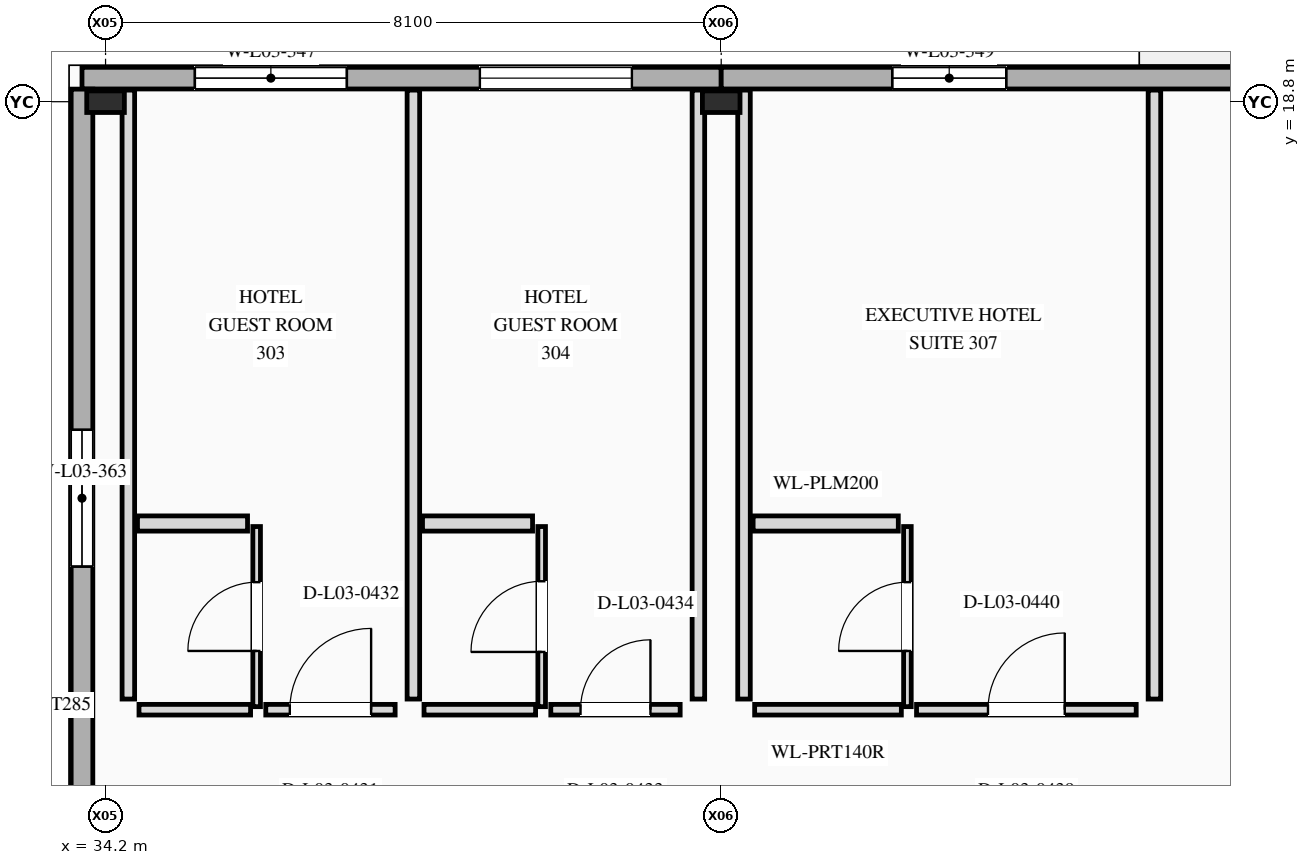
"""IFC4 building model, lengths in metres.
Left out: names, types, materials, properties, quantities, classifications, styles, units other than length and angle.
Written with IfcOpenShell. Run it as: python <this file> out.ifc"""

import sys

from ifc_helpers import new_model, si_unit, direction, frame, frame_2d, origin, origin_2d, place, context, subcontext, project, spatial, rectangle, i_section, extrude, element, fill, save


model = new_model("IFC4")
c1 = context("Model", 3, precision=1e-05, world=origin(), true_north=direction((0.0, 1.0)))
c2 = subcontext(c1, "Body", "Model", "MODEL_VIEW")
j1 = project(units=[si_unit("LENGTHUNIT", "METRE"), si_unit("PLANEANGLEUNIT", "RADIAN")], contexts=[c1])
p1 = place(None, origin())
s1 = spatial("IfcSite", under=j1, at=p1, CompositionType="ELEMENT")
p2 = place(p1, origin())
s2 = spatial("IfcBuilding", under=s1, at=p2, CompositionType="ELEMENT")
p3 = place(p2, frame((0.0, 0.0, 15.6)))
s3 = spatial("IfcBuildingStorey", under=s2, at=p3, CompositionType="ELEMENT", Elevation=15.6)
for number, where, z_axis, x_axis in (
    (1, (34.2, 18.8, 0.0), (0.0, 0.0, 1.0), (0.0, 1.0, 0.0)),
    (2, (42.3, 18.8, 0.0), (0.0, 0.0, 1.0), (0.0, 1.0, 0.0)),
):
    element("IfcColumn", number, at=place(p3, frame(where, z_axis=z_axis, x_axis=x_axis)), inside=s3, PredefinedType="COLUMN", context=c2, shape_type="SweptSolid", body=[
        extrude(i_section(OverallWidth=0.284, OverallDepth=0.495, WebThickness=0.019, FlangeThickness=0.033, at=origin_2d()), origin(), (0.0, 0.0, 1.0), 3.9),
    ])
p4 = place(p3, frame((42.3, 19.11, 0.0), z_axis=(0.0, 0.0, 1.0), x_axis=(-1.0, 0.0, 0.0)))
e3 = element("IfcWall", 3, at=p4, inside=s3, PredefinedType="STANDARD", context=c2, shape_type="SweptSolid", body=[
    extrude(rectangle(XDim=8.41, YDim=0.285, at=frame_2d((4.205, 0.0))), origin(), (0.0, 0.0, 1.0), 3.9),
])
p5 = place(p4, frame((4.925, 0.0, 0.85)))
e4 = element("IfcOpeningElement", 4, at=p5, cuts=e3, PredefinedType="OPENING", context=c2, shape_type="SweptSolid", body=[
    extrude(rectangle(XDim=2.0, YDim=1.65, at=frame_2d((1.0, 0.825))), frame((0.0, 0.152, 0.0), z_axis=(0.0, -1.0, 0.0), x_axis=(1.0, 0.0, 0.0)), (0.0, 0.0, 1.0), 0.305),
])
p6 = place(p4, frame((1.175, 0.0, 0.85)))
e5 = element("IfcOpeningElement", 5, at=p6, cuts=e3, PredefinedType="OPENING", context=c2, shape_type="SweptSolid", body=[
    extrude(rectangle(XDim=2.0, YDim=1.65, at=frame_2d((1.0, 0.825))), frame((0.0, 0.152, 0.0), z_axis=(0.0, -1.0, 0.0), x_axis=(1.0, 0.0, 0.0)), (0.0, 0.0, 1.0), 0.305),
])
p7 = place(p3, frame((50.4, 19.11, 0.0), z_axis=(0.0, 0.0, 1.0), x_axis=(-1.0, 0.0, 0.0)))
e6 = element("IfcWall", 6, at=p7, inside=s3, PredefinedType="STANDARD", context=c2, shape_type="SweptSolid", body=[
    extrude(rectangle(XDim=8.1, YDim=0.285, at=frame_2d((4.05, 0.0))), origin(), (0.0, 0.0, 1.0), 3.9),
])
p8 = place(p7, frame((4.35, 0.0, 0.85)))
e7 = element("IfcOpeningElement", 7, at=p8, cuts=e6, PredefinedType="OPENING", context=c2, shape_type="SweptSolid", body=[
    extrude(rectangle(XDim=1.5, YDim=1.7, at=frame_2d((0.75, 0.85))), frame((0.0, 0.152, 0.0), z_axis=(0.0, -1.0, 0.0), x_axis=(1.0, 0.0, 0.0)), (0.0, 0.0, 1.0), 0.305),
])
p9 = place(p3, frame((33.89, 18.966, 0.0), z_axis=(0.0, 0.0, 1.0), x_axis=(0.0, -1.0, 0.0)))
e8 = element("IfcWall", 8, at=p9, inside=s3, PredefinedType="STANDARD", context=c2, shape_type="SweptSolid", body=[
    extrude(rectangle(XDim=10.766, YDim=0.285, at=frame_2d((5.383, 0.0))), origin(), (0.0, 0.0, 1.0), 3.9),
])
p10 = place(p9, frame((4.483, 0.0, 0.88)))
e9 = element("IfcOpeningElement", 9, at=p10, cuts=e8, PredefinedType="OPENING", context=c2, shape_type="SweptSolid", body=[
    extrude(rectangle(XDim=1.8, YDim=1.8, at=frame_2d((0.9, 0.9))), frame((0.0, 0.152, 0.0), z_axis=(0.0, -1.0, 0.0), x_axis=(1.0, 0.0, 0.0)), (0.0, 0.0, 1.0), 0.305),
])
p11 = place(p3, frame((34.64, 10.8, 0.0), z_axis=(0.0, 0.0, 1.0), x_axis=(1.0, 0.0, 0.0)))
e10 = element("IfcWall", 10, at=p11, inside=s3, PredefinedType="PARTITIONING", context=c2, shape_type="SweptSolid", body=[
    extrude(rectangle(XDim=1.468, YDim=0.14, at=frame_2d((0.734, 0.0))), origin(), (0.0, 0.0, 1.0), 3.6),
])
p12 = place(p3, frame((36.308, 10.8, 0.0), z_axis=(0.0, 0.0, 1.0), x_axis=(1.0, 0.0, 0.0)))
e11 = element("IfcWall", 11, at=p12, inside=s3, PredefinedType="PARTITIONING", context=c2, shape_type="SweptSolid", body=[
    extrude(rectangle(XDim=1.702, YDim=0.14, at=frame_2d((0.851, 0.0))), origin(), (0.0, 0.0, 1.0), 3.6),
])
p13 = place(p12, frame((0.316, 0.0, 0.0)))
e12 = element("IfcOpeningElement", 12, at=p13, cuts=e11, PredefinedType="OPENING", context=c2, shape_type="SweptSolid", body=[
    extrude(rectangle(XDim=1.07, YDim=2.25, at=frame_2d((0.535, 1.125))), frame((0.0, 0.08, 0.0), z_axis=(0.0, -1.0, 0.0), x_axis=(1.0, 0.0, 0.0)), (0.0, 0.0, 1.0), 0.16),
])
p14 = place(p3, frame((34.5, 10.94, 0.0), z_axis=(0.0, 0.0, 1.0), x_axis=(0.0, 1.0, 0.0)))
e13 = element("IfcWall", 13, at=p14, inside=s3, PredefinedType="PARTITIONING", context=c2, shape_type="SweptSolid", body=[
    extrude(rectangle(XDim=8.012, YDim=0.165, at=frame_2d((4.006, 0.0))), origin(), (0.0, 0.0, 1.0), 2.929),
])
p15 = place(p3, frame((38.25, 10.94, 0.0), z_axis=(0.0, 0.0, 1.0), x_axis=(0.0, 1.0, 0.0)))
e14 = element("IfcWall", 14, at=p15, inside=s3, PredefinedType="PARTITIONING", context=c2, shape_type="SweptSolid", body=[
    extrude(rectangle(XDim=8.012, YDim=0.165, at=frame_2d((4.006, 0.0))), origin(), (0.0, 0.0, 1.0), 3.013),
])
p16 = place(p3, frame((36.188, 10.84, 0.0), z_axis=(0.0, 0.0, 1.0), x_axis=(0.0, 1.0, 0.0)))
e15 = element("IfcWall", 15, at=p16, inside=s3, PredefinedType="PARTITIONING", context=c2, shape_type="SweptSolid", body=[
    extrude(rectangle(XDim=2.37, YDim=0.1, at=frame_2d((1.185, 0.0))), origin(), (0.0, 0.0, 1.0), 3.269),
])
p17 = place(p16, frame((0.733, 0.0, 0.0)))
e16 = element("IfcOpeningElement", 16, at=p17, cuts=e15, PredefinedType="OPENING", context=c2, shape_type="SweptSolid", body=[
    extrude(rectangle(XDim=0.905, YDim=2.18, at=frame_2d((0.453, 1.09))), frame((0.0, 0.06, 0.0), z_axis=(0.0, -1.0, 0.0), x_axis=(1.0, 0.0, 0.0)), (0.0, 0.0, 1.0), 0.12),
])
p18 = place(p3, frame((34.62, 13.25, 0.0), z_axis=(0.0, 0.0, 1.0), x_axis=(1.0, 0.0, 0.0)))
e17 = element("IfcWall", 17, at=p18, inside=s3, PredefinedType="PLUMBINGWALL", context=c2, shape_type="SweptSolid", body=[
    extrude(rectangle(XDim=1.448, YDim=0.2, at=frame_2d((0.724, 0.0))), origin(), (0.0, 0.0, 1.0), 3.6),
])
p19 = place(p3, frame((38.39, 10.8, 0.0), z_axis=(0.0, 0.0, 1.0), x_axis=(1.0, 0.0, 0.0)))
e18 = element("IfcWall", 18, at=p19, inside=s3, PredefinedType="PARTITIONING", context=c2, shape_type="SweptSolid", body=[
    extrude(rectangle(XDim=1.468, YDim=0.14, at=frame_2d((0.734, 0.0))), origin(), (0.0, 0.0, 1.0), 3.6),
])
p20 = place(p3, frame((40.058, 10.8, 0.0), z_axis=(0.0, 0.0, 1.0), x_axis=(1.0, 0.0, 0.0)))
e19 = element("IfcWall", 19, at=p20, inside=s3, PredefinedType="PARTITIONING", context=c2, shape_type="SweptSolid", body=[
    extrude(rectangle(XDim=1.702, YDim=0.14, at=frame_2d((0.851, 0.0))), origin(), (0.0, 0.0, 1.0), 3.6),
])
p21 = place(p20, frame((0.391, 0.0, 0.0)))
e20 = element("IfcOpeningElement", 20, at=p21, cuts=e19, PredefinedType="OPENING", context=c2, shape_type="SweptSolid", body=[
    extrude(rectangle(XDim=0.92, YDim=2.3, at=frame_2d((0.46, 1.15))), frame((0.0, 0.08, 0.0), z_axis=(0.0, -1.0, 0.0), x_axis=(1.0, 0.0, 0.0)), (0.0, 0.0, 1.0), 0.16),
])
p22 = place(p3, frame((42.0, 10.94, 0.0), z_axis=(0.0, 0.0, 1.0), x_axis=(0.0, 1.0, 0.0)))
e21 = element("IfcWall", 21, at=p22, inside=s3, PredefinedType="PARTITIONING", context=c2, shape_type="SweptSolid", body=[
    extrude(rectangle(XDim=8.012, YDim=0.165, at=frame_2d((4.006, 0.0))), origin(), (0.0, 0.0, 1.0), 2.929),
])
p23 = place(p3, frame((39.938, 10.84, 0.0), z_axis=(0.0, 0.0, 1.0), x_axis=(0.0, 1.0, 0.0)))
e22 = element("IfcWall", 22, at=p23, inside=s3, PredefinedType="PARTITIONING", context=c2, shape_type="SweptSolid", body=[
    extrude(rectangle(XDim=2.37, YDim=0.1, at=frame_2d((1.185, 0.0))), origin(), (0.0, 0.0, 1.0), 3.269),
])
p24 = place(p23, frame((0.72, 0.0, 0.0)))
e23 = element("IfcOpeningElement", 23, at=p24, cuts=e22, PredefinedType="OPENING", context=c2, shape_type="SweptSolid", body=[
    extrude(rectangle(XDim=0.93, YDim=2.22, at=frame_2d((0.465, 1.11))), frame((0.0, 0.06, 0.0), z_axis=(0.0, -1.0, 0.0), x_axis=(1.0, 0.0, 0.0)), (0.0, 0.0, 1.0), 0.12),
])
p25 = place(p3, frame((38.37, 13.25, 0.0), z_axis=(0.0, 0.0, 1.0), x_axis=(1.0, 0.0, 0.0)))
e24 = element("IfcWall", 24, at=p25, inside=s3, PredefinedType="PLUMBINGWALL", context=c2, shape_type="SweptSolid", body=[
    extrude(rectangle(XDim=1.448, YDim=0.2, at=frame_2d((0.724, 0.0))), origin(), (0.0, 0.0, 1.0), 3.6),
])
p26 = place(p3, frame((42.74, 10.8, 0.0), z_axis=(0.0, 0.0, 1.0), x_axis=(1.0, 0.0, 0.0)))
e25 = element("IfcWall", 25, at=p26, inside=s3, PredefinedType="PARTITIONING", context=c2, shape_type="SweptSolid", body=[
    extrude(rectangle(XDim=1.93, YDim=0.14, at=frame_2d((0.965, 0.0))), origin(), (0.0, 0.0, 1.0), 3.6),
])
p27 = place(p3, frame((44.87, 10.8, 0.0), z_axis=(0.0, 0.0, 1.0), x_axis=(1.0, 0.0, 0.0)))
e26 = element("IfcWall", 26, at=p27, inside=s3, PredefinedType="PARTITIONING", context=c2, shape_type="SweptSolid", body=[
    extrude(rectangle(XDim=2.89, YDim=0.14, at=frame_2d((1.445, 0.0))), origin(), (0.0, 0.0, 1.0), 3.6),
])
p28 = place(p27, frame((0.94, 0.0, 0.0)))
e27 = element("IfcOpeningElement", 27, at=p28, cuts=e26, PredefinedType="OPENING", context=c2, shape_type="SweptSolid", body=[
    extrude(rectangle(XDim=1.01, YDim=2.35, at=frame_2d((0.505, 1.175))), frame((0.0, 0.08, 0.0), z_axis=(0.0, -1.0, 0.0), x_axis=(1.0, 0.0, 0.0)), (0.0, 0.0, 1.0), 0.16),
])
p29 = place(p3, frame((42.6, 10.94, 0.0), z_axis=(0.0, 0.0, 1.0), x_axis=(0.0, 1.0, 0.0)))
e28 = element("IfcWall", 28, at=p29, inside=s3, PredefinedType="PARTITIONING", context=c2, shape_type="SweptSolid", body=[
    extrude(rectangle(XDim=8.012, YDim=0.165, at=frame_2d((4.006, 0.0))), origin(), (0.0, 0.0, 1.0), 2.929),
])
p30 = place(p3, frame((48.0, 10.94, 0.0), z_axis=(0.0, 0.0, 1.0), x_axis=(0.0, 1.0, 0.0)))
e29 = element("IfcWall", 29, at=p30, inside=s3, PredefinedType="PARTITIONING", context=c2, shape_type="SweptSolid", body=[
    extrude(rectangle(XDim=8.012, YDim=0.165, at=frame_2d((4.006, 0.0))), origin(), (0.0, 0.0, 1.0), 3.6),
])
p31 = place(p3, frame((44.75, 10.84, 0.0), z_axis=(0.0, 0.0, 1.0), x_axis=(0.0, 1.0, 0.0)))
e30 = element("IfcWall", 30, at=p31, inside=s3, PredefinedType="PARTITIONING", context=c2, shape_type="SweptSolid", body=[
    extrude(rectangle(XDim=2.37, YDim=0.1, at=frame_2d((1.185, 0.0))), origin(), (0.0, 0.0, 1.0), 3.6),
])
p32 = place(p31, frame((0.733, 0.0, 0.0)))
e31 = element("IfcOpeningElement", 31, at=p32, cuts=e30, PredefinedType="OPENING", context=c2, shape_type="SweptSolid", body=[
    extrude(rectangle(XDim=0.905, YDim=2.1, at=frame_2d((0.453, 1.05))), frame((0.0, 0.06, 0.0), z_axis=(0.0, -1.0, 0.0), x_axis=(1.0, 0.0, 0.0)), (0.0, 0.0, 1.0), 0.12),
])
p33 = place(p3, frame((42.72, 13.25, 0.0), z_axis=(0.0, 0.0, 1.0), x_axis=(1.0, 0.0, 0.0)))
e32 = element("IfcWall", 32, at=p33, inside=s3, PredefinedType="PLUMBINGWALL", context=c2, shape_type="SweptSolid", body=[
    extrude(rectangle(XDim=1.91, YDim=0.2, at=frame_2d((0.955, 0.0))), origin(), (0.0, 0.0, 1.0), 3.6),
])
p34 = place(p5, origin())
e33 = element("IfcWindow", 33, at=p34, inside=s3, PartitioningType="SINGLE_PANEL", PredefinedType="WINDOW", context=c2, shape_type="SweptSolid", body=[
    extrude(rectangle(XDim=2.0, YDim=1.65, at=frame_2d((1.0, 0.825))), frame((0.0, 0.03, 0.0), z_axis=(0.0, -1.0, 0.0), x_axis=(1.0, 0.0, 0.0)), (0.0, 0.0, 1.0), 0.06),
])
fill(e4, e33)
p35 = place(p6, origin())
e34 = element("IfcWindow", 34, at=p35, inside=s3, PartitioningType="SINGLE_PANEL", PredefinedType="WINDOW", context=c2, shape_type="SweptSolid", body=[
    extrude(rectangle(XDim=2.0, YDim=1.65, at=frame_2d((1.0, 0.825))), frame((0.0, 0.03, 0.0), z_axis=(0.0, -1.0, 0.0), x_axis=(1.0, 0.0, 0.0)), (0.0, 0.0, 1.0), 0.06),
])
fill(e5, e34)
p36 = place(p8, origin())
e35 = element("IfcWindow", 35, at=p36, inside=s3, PartitioningType="SINGLE_PANEL", PredefinedType="WINDOW", context=c2, shape_type="SweptSolid", body=[
    extrude(rectangle(XDim=1.5, YDim=1.7, at=frame_2d((0.75, 0.85))), frame((0.0, 0.03, 0.0), z_axis=(0.0, -1.0, 0.0), x_axis=(1.0, 0.0, 0.0)), (0.0, 0.0, 1.0), 0.06),
])
fill(e7, e35)
p37 = place(p10, origin())
e36 = element("IfcWindow", 36, at=p37, inside=s3, PartitioningType="SINGLE_PANEL", PredefinedType="WINDOW", context=c2, shape_type="SweptSolid", body=[
    extrude(rectangle(XDim=1.8, YDim=1.8, at=frame_2d((0.9, 0.9))), frame((0.0, 0.03, 0.0), z_axis=(0.0, -1.0, 0.0), x_axis=(1.0, 0.0, 0.0)), (0.0, 0.0, 1.0), 0.06),
])
fill(e9, e36)
p38 = place(p13, origin())
e37 = element("IfcDoor", 37, at=p38, inside=s3, OperationType="SINGLE_SWING_RIGHT", PredefinedType="DOOR", context=c2, shape_type="SweptSolid", body=[
    extrude(rectangle(XDim=1.07, YDim=2.25, at=frame_2d((0.535, 1.125))), frame((0.0, 0.025, 0.0), z_axis=(0.0, -1.0, 0.0), x_axis=(1.0, 0.0, 0.0)), (0.0, 0.0, 1.0), 0.05),
])
fill(e12, e37)
p39 = place(p17, origin())
e38 = element("IfcDoor", 38, at=p39, inside=s3, OperationType="SINGLE_SWING_LEFT", PredefinedType="DOOR", context=c2, shape_type="SweptSolid", body=[
    extrude(rectangle(XDim=0.905, YDim=2.18, at=frame_2d((0.453, 1.09))), frame((0.0, 0.025, 0.0), z_axis=(0.0, -1.0, 0.0), x_axis=(1.0, 0.0, 0.0)), (0.0, 0.0, 1.0), 0.05),
])
fill(e16, e38)
p40 = place(p21, origin())
e39 = element("IfcDoor", 39, at=p40, inside=s3, OperationType="SINGLE_SWING_RIGHT", PredefinedType="DOOR", context=c2, shape_type="SweptSolid", body=[
    extrude(rectangle(XDim=0.92, YDim=2.3, at=frame_2d((0.46, 1.15))), frame((0.0, 0.025, 0.0), z_axis=(0.0, -1.0, 0.0), x_axis=(1.0, 0.0, 0.0)), (0.0, 0.0, 1.0), 0.05),
])
fill(e20, e39)
p41 = place(p24, origin())
e40 = element("IfcDoor", 40, at=p41, inside=s3, OperationType="SINGLE_SWING_LEFT", PredefinedType="DOOR", context=c2, shape_type="SweptSolid", body=[
    extrude(rectangle(XDim=0.93, YDim=2.22, at=frame_2d((0.465, 1.11))), frame((0.0, 0.025, 0.0), z_axis=(0.0, -1.0, 0.0), x_axis=(1.0, 0.0, 0.0)), (0.0, 0.0, 1.0), 0.05),
])
fill(e23, e40)
p42 = place(p28, origin())
e41 = element("IfcDoor", 41, at=p42, inside=s3, OperationType="SINGLE_SWING_RIGHT", PredefinedType="DOOR", context=c2, shape_type="SweptSolid", body=[
    extrude(rectangle(XDim=1.01, YDim=2.35, at=frame_2d((0.505, 1.175))), frame((0.0, 0.025, 0.0), z_axis=(0.0, -1.0, 0.0), x_axis=(1.0, 0.0, 0.0)), (0.0, 0.0, 1.0), 0.05),
])
fill(e27, e41)
p43 = place(p32, origin())
e42 = element("IfcDoor", 42, at=p43, inside=s3, OperationType="SINGLE_SWING_LEFT", PredefinedType="DOOR", context=c2, shape_type="SweptSolid", body=[
    extrude(rectangle(XDim=0.905, YDim=2.1, at=frame_2d((0.453, 1.05))), frame((0.0, 0.025, 0.0), z_axis=(0.0, -1.0, 0.0), x_axis=(1.0, 0.0, 0.0)), (0.0, 0.0, 1.0), 0.05),
])
fill(e31, e42)
save(model, sys.argv[1])
